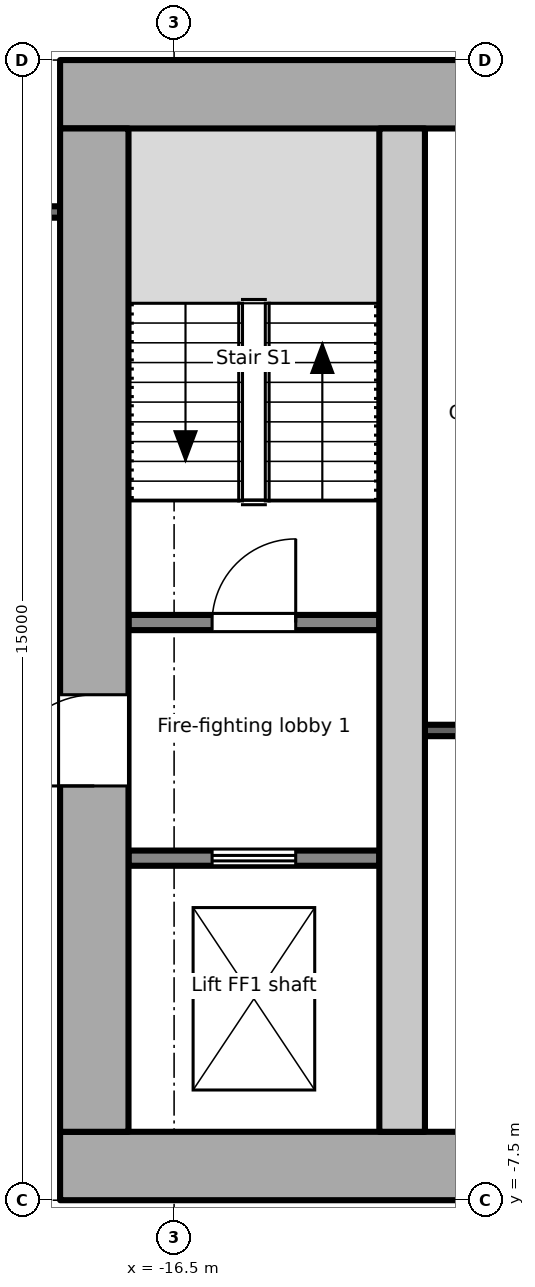
"""IFC4 building model, lengths in metres.
Left out: names, types, materials, properties, quantities, classifications, styles, units other than length and angle.
Written with IfcOpenShell. Run it as: python <this file> out.ifc"""

import sys

from ifc_helpers import new_model, si_unit, direction, frame, frame_2d, origin, place, context, subcontext, project, spatial, rectangle, extrude, element, fill, save


model = new_model("IFC4")
c1 = context("Model", 3, precision=1e-05, world=origin(), true_north=direction((0.0, 1.0)))
c2 = subcontext(c1, "Body", "Model", "MODEL_VIEW")
j1 = project(units=[si_unit("LENGTHUNIT", "METRE"), si_unit("PLANEANGLEUNIT", "RADIAN")], contexts=[c1])
p1 = place(None, origin())
s1 = spatial("IfcSite", under=j1, at=p1, CompositionType="ELEMENT")
p2 = place(p1, origin())
s2 = spatial("IfcBuilding", under=s1, at=p2, CompositionType="ELEMENT")
p3 = place(p2, frame((0.0, 0.0, 195.8)))
s3 = spatial("IfcBuildingStorey", under=s2, at=p3, CompositionType="ELEMENT", Elevation=195.8)
p4 = place(p3, frame((-18.0, -7.05, -0.2), z_axis=(0.0, 0.0, 1.0), x_axis=(1.0, 0.0, 0.0)))
e1 = element("IfcWall", 1, at=p4, inside=s3, PredefinedType="SHEAR", context=c2, shape_type="SweptSolid", body=[
    extrude(rectangle(XDim=36.0, YDim=0.9, at=frame_2d((18.0, 0.0))), origin(), (0.0, 0.0, 1.0), 3.9),
])
p5 = place(p4, frame((8.1, 0.0, 0.2)))
e2 = element("IfcOpeningElement", 2, at=p5, cuts=e1, PredefinedType="OPENING", context=c2, shape_type="SweptSolid", body=[
    extrude(rectangle(XDim=1.8, YDim=2.1, at=frame_2d((0.9, 1.05))), frame((0.0, 0.46, 0.0), z_axis=(0.0, -1.0, 0.0), x_axis=(1.0, 0.0, 0.0)), (0.0, 0.0, 1.0), 0.921),
])
p6 = place(p4, frame((16.8, 0.0, 0.2)))
e3 = element("IfcOpeningElement", 3, at=p6, cuts=e1, PredefinedType="OPENING", context=c2, shape_type="SweptSolid", body=[
    extrude(rectangle(XDim=2.4, YDim=2.1, at=frame_2d((1.2, 1.05))), frame((0.0, 0.46, 0.0), z_axis=(0.0, -1.0, 0.0), x_axis=(1.0, 0.0, 0.0)), (0.0, 0.0, 1.0), 0.921),
])
p7 = place(p4, frame((26.1, 0.0, 0.2)))
e4 = element("IfcOpeningElement", 4, at=p7, cuts=e1, PredefinedType="OPENING", context=c2, shape_type="SweptSolid", body=[
    extrude(rectangle(XDim=2.4, YDim=2.1, at=frame_2d((1.2, 1.05))), frame((0.0, 0.46, 0.0), z_axis=(0.0, -1.0, 0.0), x_axis=(1.0, 0.0, 0.0)), (0.0, 0.0, 1.0), 0.921),
])
p8 = place(p3, frame((-18.0, 7.05, -0.2), z_axis=(0.0, 0.0, 1.0), x_axis=(1.0, 0.0, 0.0)))
e5 = element("IfcWall", 5, at=p8, inside=s3, PredefinedType="SHEAR", context=c2, shape_type="SweptSolid", body=[
    extrude(rectangle(XDim=36.0, YDim=0.9, at=frame_2d((18.0, 0.0))), origin(), (0.0, 0.0, 1.0), 3.9),
])
p9 = place(p3, frame((-17.55, -6.6, -0.2), z_axis=(0.0, 0.0, 1.0), x_axis=(0.0, 1.0, 0.0)))
e6 = element("IfcWall", 6, at=p9, inside=s3, PredefinedType="SHEAR", context=c2, shape_type="SweptSolid", body=[
    extrude(rectangle(XDim=13.2, YDim=0.9, at=frame_2d((6.6, 0.0))), origin(), (0.0, 0.0, 1.0), 3.9),
])
p10 = place(p9, frame((4.55, 0.0, 0.2)))
e7 = element("IfcOpeningElement", 7, at=p10, cuts=e6, PredefinedType="OPENING", context=c2, shape_type="SweptSolid", body=[
    extrude(rectangle(XDim=1.2, YDim=2.1, at=frame_2d((0.6, 1.05))), frame((0.0, 0.46, 0.0), z_axis=(0.0, -1.0, 0.0), x_axis=(1.0, 0.0, 0.0)), (0.0, 0.0, 1.0), 0.921),
])
p11 = place(p3, frame((-13.5, -6.6, -0.2), z_axis=(0.0, 0.0, 1.0), x_axis=(0.0, 1.0, 0.0)))
e8 = element("IfcWall", 8, at=p11, inside=s3, PredefinedType="SHEAR", context=c2, shape_type="SweptSolid", body=[
    extrude(rectangle(XDim=13.2, YDim=0.6, at=frame_2d((6.6, 0.0))), origin(), (0.0, 0.0, 1.0), 3.9),
])
p12 = place(p3, frame((-17.1, -3.0, 0.0), z_axis=(0.0, 0.0, 1.0), x_axis=(1.0, 0.0, 0.0)))
e9 = element("IfcWall", 9, at=p12, inside=s3, PredefinedType="PARTITIONING", context=c2, shape_type="SweptSolid", body=[
    extrude(rectangle(XDim=3.3, YDim=0.2, at=frame_2d((1.65, 0.0))), origin(), (0.0, 0.0, 1.0), 3.7),
])
p13 = place(p12, frame((1.1, 0.0, 0.0)))
e10 = element("IfcOpeningElement", 10, at=p13, cuts=e9, PredefinedType="OPENING", context=c2, shape_type="SweptSolid", body=[
    extrude(rectangle(XDim=1.1, YDim=2.1, at=frame_2d((0.55, 1.05))), frame((0.0, 0.111, 0.0), z_axis=(0.0, -1.0, 0.0), x_axis=(1.0, 0.0, 0.0)), (0.0, 0.0, 1.0), 0.221),
])
p14 = place(p3, frame((-17.1, 0.1, 0.0), z_axis=(0.0, 0.0, 1.0), x_axis=(1.0, 0.0, 0.0)))
e11 = element("IfcWall", 11, at=p14, inside=s3, PredefinedType="PARTITIONING", context=c2, shape_type="SweptSolid", body=[
    extrude(rectangle(XDim=3.3, YDim=0.2, at=frame_2d((1.65, 0.0))), origin(), (0.0, 0.0, 1.0), 3.7),
])
p15 = place(p14, frame((1.1, 0.0, 0.0)))
e12 = element("IfcOpeningElement", 12, at=p15, cuts=e11, PredefinedType="OPENING", context=c2, shape_type="SweptSolid", body=[
    extrude(rectangle(XDim=1.1, YDim=2.1, at=frame_2d((0.55, 1.05))), frame((0.0, 0.111, 0.0), z_axis=(0.0, -1.0, 0.0), x_axis=(1.0, 0.0, 0.0)), (0.0, 0.0, 1.0), 0.221),
])
p16 = place(p3, frame((-13.2, -1.32, 0.0), z_axis=(0.0, 0.0, 1.0), x_axis=(1.0, 0.0, 0.0)))
e13 = element("IfcWall", 13, at=p16, inside=s3, PredefinedType="PARTITIONING", context=c2, shape_type="SweptSolid", body=[
    extrude(rectangle(XDim=3.05, YDim=0.15, at=frame_2d((1.525, 0.0))), origin(), (0.0, 0.0, 1.0), 3.7),
])
p17 = place(p3, frame((-20.325, 5.501, 0.0), z_axis=(0.0, 0.0, 1.0), x_axis=(1.0, 0.0, 0.0)))
e14 = element("IfcWall", 14, at=p17, inside=s3, PredefinedType="PARTITIONING", context=c2, shape_type="SweptSolid", body=[
    extrude(rectangle(XDim=2.325, YDim=0.15, at=frame_2d((1.163, 0.0))), origin(), (0.0, 0.0, 1.0), 3.7),
])
p18 = place(p13, origin())
e15 = element("IfcDoor", 15, at=p18, inside=s3, OperationType="DOUBLE_DOOR_SLIDING", PredefinedType="DOOR", context=c2, shape_type="SweptSolid", body=[
    extrude(rectangle(XDim=1.1, YDim=2.1, at=frame_2d((0.55, 1.05))), frame((0.0, 0.025, 0.0), z_axis=(0.0, -1.0, 0.0), x_axis=(1.0, 0.0, 0.0)), (0.0, 0.0, 1.0), 0.05),
])
fill(e10, e15)
p19 = place(p10, origin())
e16 = element("IfcDoor", 16, at=p19, inside=s3, OperationType="SINGLE_SWING_LEFT", PredefinedType="DOOR", context=c2, shape_type="SweptSolid", body=[
    extrude(rectangle(XDim=1.2, YDim=2.1, at=frame_2d((0.6, 1.05))), frame((0.0, 0.025, 0.0), z_axis=(0.0, -1.0, 0.0), x_axis=(1.0, 0.0, 0.0)), (0.0, 0.0, 1.0), 0.05),
])
fill(e7, e16)
p20 = place(p15, origin())
e17 = element("IfcDoor", 17, at=p20, inside=s3, OperationType="SINGLE_SWING_RIGHT", PredefinedType="DOOR", context=c2, shape_type="SweptSolid", body=[
    extrude(rectangle(XDim=1.1, YDim=2.1, at=frame_2d((0.55, 1.05))), frame((0.0, 0.025, 0.0), z_axis=(0.0, -1.0, 0.0), x_axis=(1.0, 0.0, 0.0)), (0.0, 0.0, 1.0), 0.05),
])
fill(e12, e17)
save(model, sys.argv[1])
